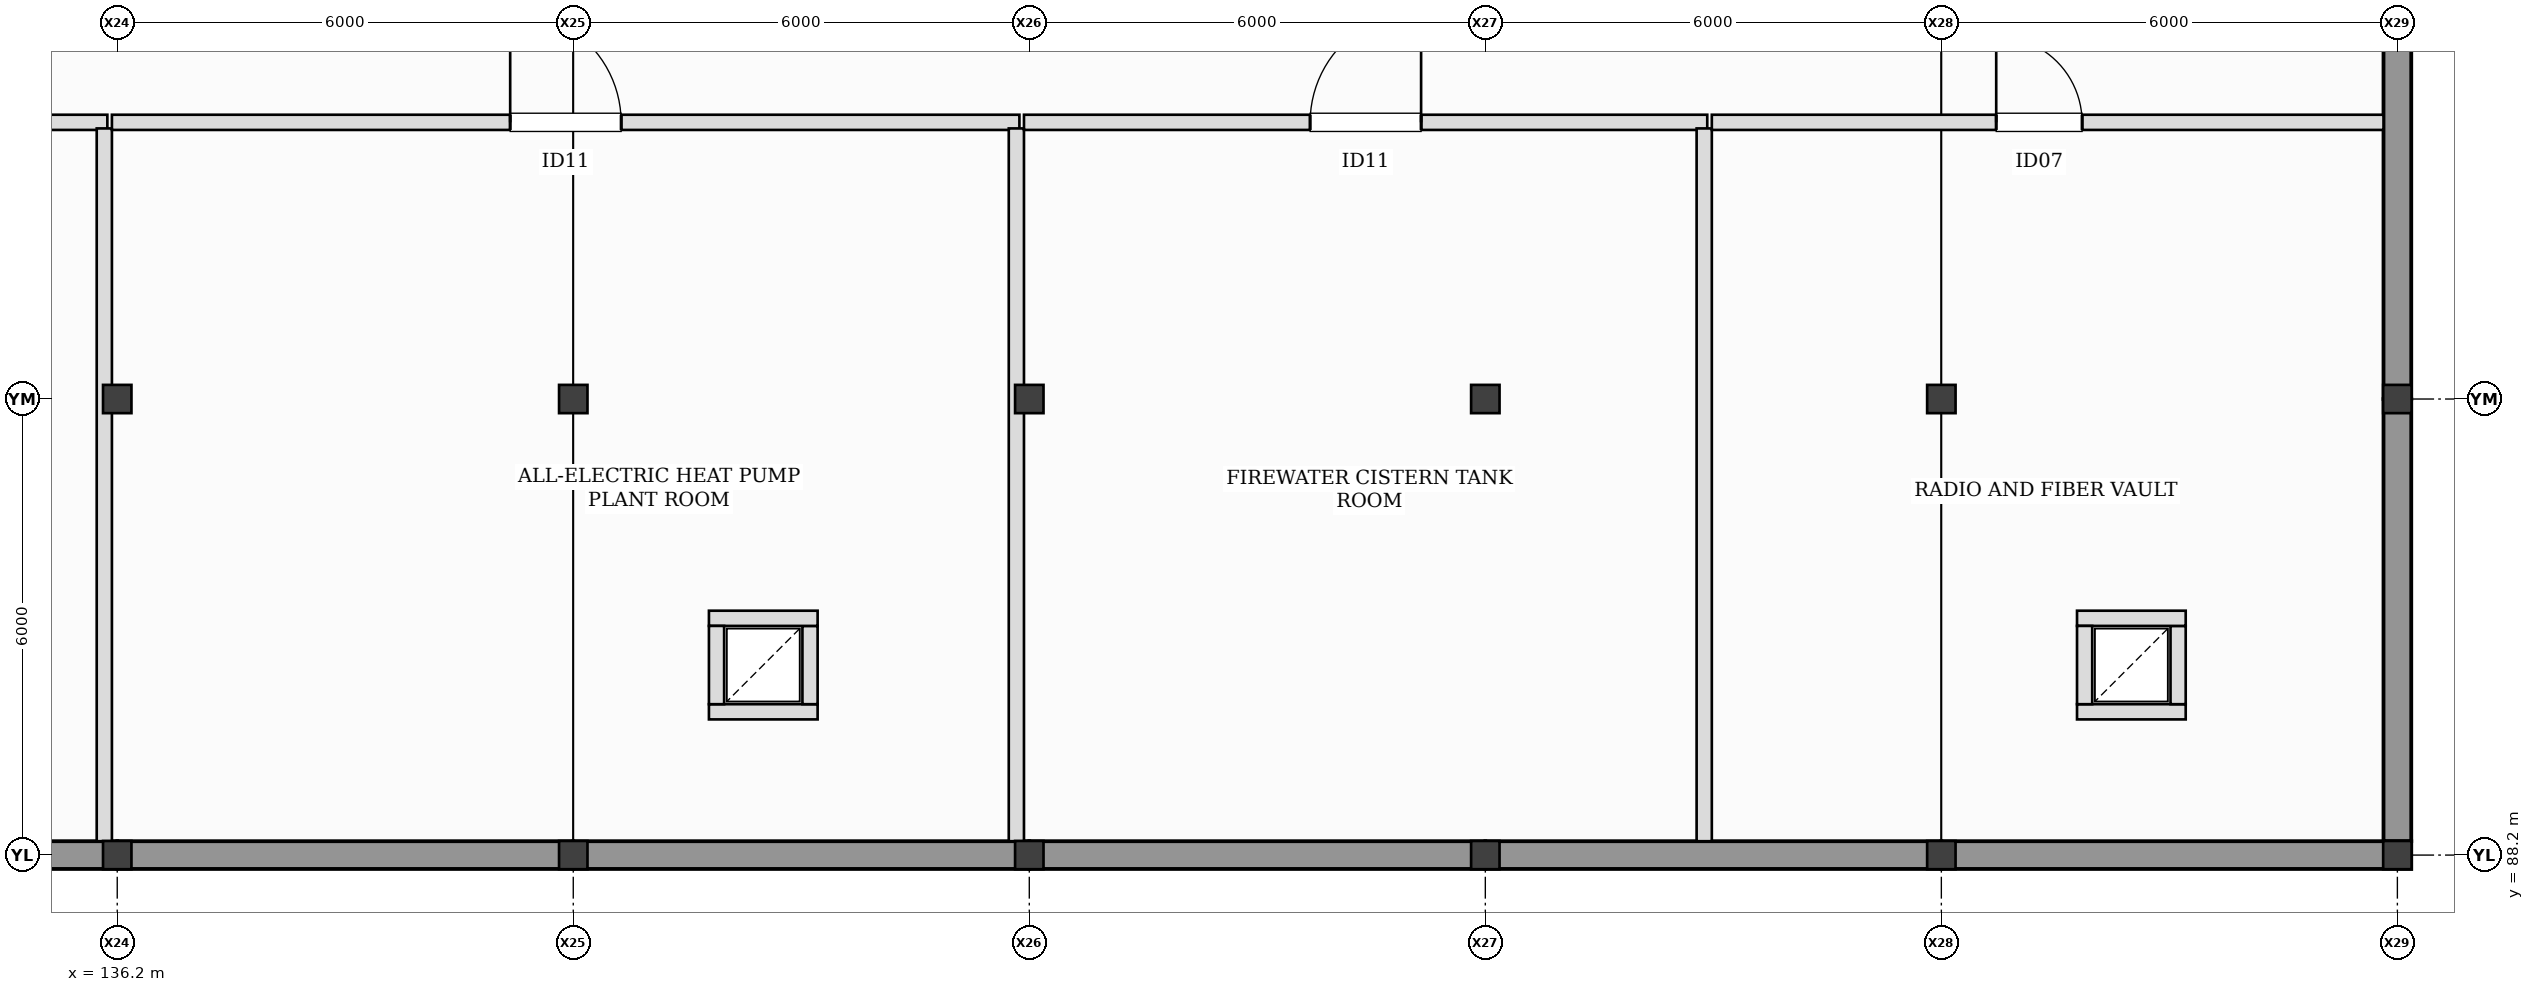
"""IFC4 building model, lengths in metres.
Left out: names, types, materials, properties, quantities, classifications, styles, units other than length and angle.
Written with IfcOpenShell. Run it as: python <this file> out.ifc"""

import sys

from ifc_helpers import new_model, si_unit, direction, frame, frame_2d, origin, origin_2d, place, context, subcontext, project, spatial, rectangle, i_section, extrude, element, fill, save


model = new_model("IFC4")
c1 = context("Model", 3, precision=1e-05, world=origin(), true_north=direction((0.0, 1.0)))
c2 = subcontext(c1, "Body", "Model", "MODEL_VIEW")
j1 = project(units=[si_unit("LENGTHUNIT", "METRE"), si_unit("PLANEANGLEUNIT", "RADIAN")], contexts=[c1])
p1 = place(None, origin())
s1 = spatial("IfcSite", under=j1, at=p1, CompositionType="ELEMENT")
p2 = place(p1, origin())
s2 = spatial("IfcBuilding", under=s1, at=p2, CompositionType="ELEMENT")
p3 = place(p2, frame((0.0, 0.0, -4.2)))
s3 = spatial("IfcBuildingStorey", under=s2, at=p3, CompositionType="ELEMENT", Elevation=-4.2)
for number, where, z_axis, x_axis in (
    (1, (136.2, 88.2, -0.45), (0.0, 0.0, 1.0), (1.0, 0.0, 0.0)),
    (2, (136.2, 94.2, -0.45), (0.0, 0.0, 1.0), (1.0, 0.0, 0.0)),
    (3, (142.2, 88.2, -0.45), (0.0, 0.0, 1.0), (1.0, 0.0, 0.0)),
    (4, (142.2, 94.2, -0.45), (0.0, 0.0, 1.0), (1.0, 0.0, 0.0)),
    (5, (148.2, 88.2, -0.45), (0.0, 0.0, 1.0), (1.0, 0.0, 0.0)),
    (6, (148.2, 94.2, -0.45), (0.0, 0.0, 1.0), (1.0, 0.0, 0.0)),
    (7, (154.2, 88.2, -0.45), (0.0, 0.0, 1.0), (1.0, 0.0, 0.0)),
    (8, (154.2, 94.2, -0.45), (0.0, 0.0, 1.0), (1.0, 0.0, 0.0)),
    (9, (160.2, 88.2, -0.45), (0.0, 0.0, 1.0), (1.0, 0.0, 0.0)),
    (10, (160.2, 94.2, -0.45), (0.0, 0.0, 1.0), (1.0, 0.0, 0.0)),
    (11, (166.2, 88.2, -0.45), (0.0, 0.0, 1.0), (1.0, 0.0, 0.0)),
    (12, (166.2, 94.2, -0.45), (0.0, 0.0, 1.0), (1.0, 0.0, 0.0)),
):
    element("IfcColumn", number, at=place(p3, frame(where, z_axis=z_axis, x_axis=x_axis)), inside=s3, PredefinedType="COLUMN", context=c2, shape_type="SweptSolid", body=[
        extrude(i_section(OverallWidth=0.374, OverallDepth=0.372, WebThickness=0.016, FlangeThickness=0.026, at=origin_2d()), origin(), (0.0, 0.0, 1.0), 4.65),
    ])
for number, where, z_axis, x_axis in (
    (13, (130.201, 88.2, 0.0), (0.0, 0.0, 1.0), (1.0, 0.0, 0.0)),
    (14, (136.201, 88.2, 0.0), (0.0, 0.0, 1.0), (1.0, 0.0, 0.0)),
    (15, (142.201, 88.2, 0.0), (0.0, 0.0, 1.0), (1.0, 0.0, 0.0)),
    (16, (148.201, 88.2, 0.0), (0.0, 0.0, 1.0), (1.0, 0.0, 0.0)),
    (17, (154.201, 88.2, 0.0), (0.0, 0.0, 1.0), (1.0, 0.0, 0.0)),
):
    element("IfcWall", number, at=place(p3, frame(where, z_axis=z_axis, x_axis=x_axis)), inside=s3, PredefinedType="SHEAR", context=c2, shape_type="SweptSolid", body=[
        extrude(rectangle(XDim=5.998, YDim=0.365, at=frame_2d((2.999, 0.0))), origin(), (0.0, 0.0, 1.0), 3.85),
    ])
p4 = place(p3, frame((160.201, 88.2, 0.0), z_axis=(0.0, 0.0, 1.0), x_axis=(1.0, 0.0, 0.0)))
e18 = element("IfcWall", 18, at=p4, inside=s3, PredefinedType="SHEAR", context=c2, shape_type="SweptSolid", body=[
    extrude(rectangle(XDim=6.182, YDim=0.365, at=frame_2d((3.091, 0.0))), origin(), (0.0, 0.0, 1.0), 3.85),
])
p5 = place(p3, frame((166.2, 88.385, 0.0), z_axis=(0.0, 0.0, 1.0), x_axis=(0.0, 1.0, 0.0)))
e19 = element("IfcWall", 19, at=p5, inside=s3, PredefinedType="SHEAR", context=c2, shape_type="SweptSolid", body=[
    extrude(rectangle(XDim=5.814, YDim=0.365, at=frame_2d((2.907, 0.0))), origin(), (0.0, 0.0, 1.0), 3.85),
])
p6 = place(p3, frame((166.2, 94.201, 0.0), z_axis=(0.0, 0.0, 1.0), x_axis=(0.0, 1.0, 0.0)))
e20 = element("IfcWall", 20, at=p6, inside=s3, PredefinedType="SHEAR", context=c2, shape_type="SweptSolid", body=[
    extrude(rectangle(XDim=5.998, YDim=0.365, at=frame_2d((2.999, 0.0))), origin(), (0.0, 0.0, 1.0), 3.85),
])
p7 = place(p3, frame((143.985, 90.085, 0.0), z_axis=(0.0, 0.0, 1.0), x_axis=(1.0, 0.0, 0.0)))
e21 = element("IfcWall", 21, at=p7, inside=s3, PredefinedType="PARTITIONING", context=c2, shape_type="SweptSolid", body=[
    extrude(rectangle(XDim=1.43, YDim=0.2, at=frame_2d((0.715, 0.0))), origin(), (0.0, 0.0, 1.0), 3.79),
])
p8 = place(p3, frame((145.315, 90.185, 0.0), z_axis=(0.0, 0.0, 1.0), x_axis=(0.0, 1.0, 0.0)))
e22 = element("IfcWall", 22, at=p8, inside=s3, PredefinedType="PARTITIONING", context=c2, shape_type="SweptSolid", body=[
    extrude(rectangle(XDim=1.03, YDim=0.2, at=frame_2d((0.515, 0.0))), origin(), (0.0, 0.0, 1.0), 3.79),
])
p9 = place(p3, frame((145.415, 91.315, 0.0), z_axis=(0.0, 0.0, 1.0), x_axis=(-1.0, 0.0, 0.0)))
e23 = element("IfcWall", 23, at=p9, inside=s3, PredefinedType="PARTITIONING", context=c2, shape_type="SweptSolid", body=[
    extrude(rectangle(XDim=1.43, YDim=0.2, at=frame_2d((0.715, 0.0))), origin(), (0.0, 0.0, 1.0), 3.79),
])
p10 = place(p3, frame((144.085, 91.215, 0.0), z_axis=(0.0, 0.0, 1.0), x_axis=(0.0, -1.0, 0.0)))
e24 = element("IfcWall", 24, at=p10, inside=s3, PredefinedType="PARTITIONING", context=c2, shape_type="SweptSolid", body=[
    extrude(rectangle(XDim=1.03, YDim=0.2, at=frame_2d((0.515, 0.0))), origin(), (0.0, 0.0, 1.0), 3.79),
])
p11 = place(p3, frame((161.985, 90.085, 0.0), z_axis=(0.0, 0.0, 1.0), x_axis=(1.0, 0.0, 0.0)))
e25 = element("IfcWall", 25, at=p11, inside=s3, PredefinedType="PARTITIONING", context=c2, shape_type="SweptSolid", body=[
    extrude(rectangle(XDim=1.43, YDim=0.2, at=frame_2d((0.715, 0.0))), origin(), (0.0, 0.0, 1.0), 3.79),
])
p12 = place(p3, frame((163.315, 90.185, 0.0), z_axis=(0.0, 0.0, 1.0), x_axis=(0.0, 1.0, 0.0)))
e26 = element("IfcWall", 26, at=p12, inside=s3, PredefinedType="PARTITIONING", context=c2, shape_type="SweptSolid", body=[
    extrude(rectangle(XDim=1.03, YDim=0.2, at=frame_2d((0.515, 0.0))), origin(), (0.0, 0.0, 1.0), 3.79),
])
p13 = place(p3, frame((163.415, 91.315, 0.0), z_axis=(0.0, 0.0, 1.0), x_axis=(-1.0, 0.0, 0.0)))
e27 = element("IfcWall", 27, at=p13, inside=s3, PredefinedType="PARTITIONING", context=c2, shape_type="SweptSolid", body=[
    extrude(rectangle(XDim=1.43, YDim=0.2, at=frame_2d((0.715, 0.0))), origin(), (0.0, 0.0, 1.0), 3.79),
])
p14 = place(p3, frame((162.085, 91.215, 0.0), z_axis=(0.0, 0.0, 1.0), x_axis=(0.0, -1.0, 0.0)))
e28 = element("IfcWall", 28, at=p14, inside=s3, PredefinedType="PARTITIONING", context=c2, shape_type="SweptSolid", body=[
    extrude(rectangle(XDim=1.03, YDim=0.2, at=frame_2d((0.515, 0.0))), origin(), (0.0, 0.0, 1.0), 3.79),
])
p15 = place(p3, frame((124.383, 97.84, 0.0), z_axis=(0.0, 0.0, 1.0), x_axis=(1.0, 0.0, 0.0)))
e29 = element("IfcWall", 29, at=p15, inside=s3, PredefinedType="PARTITIONING", context=c2, shape_type="SweptSolid", body=[
    extrude(rectangle(XDim=11.688, YDim=0.2, at=frame_2d((5.844, 0.0))), origin(), (0.0, 0.0, 1.0), 3.79),
])
p16 = place(p15, frame((5.224, 0.0, 0.0)))
e30 = element("IfcOpeningElement", 30, at=p16, cuts=e29, PredefinedType="OPENING", context=c2, shape_type="SweptSolid", body=[
    extrude(rectangle(XDim=1.46, YDim=2.3, at=frame_2d((0.73, 1.15))), frame((0.0, 0.11, 0.0), z_axis=(0.0, -1.0, 0.0), x_axis=(1.0, 0.0, 0.0)), (0.0, 0.0, 1.0), 0.22),
])
p17 = place(p3, frame((136.03, 97.76, 0.0), z_axis=(0.0, 0.0, 1.0), x_axis=(0.0, -1.0, 0.0)))
e31 = element("IfcWall", 31, at=p17, inside=s3, PredefinedType="PARTITIONING", context=c2, shape_type="SweptSolid", body=[
    extrude(rectangle(XDim=9.377, YDim=0.2, at=frame_2d((4.689, 0.0))), origin(), (0.0, 0.0, 1.0), 3.79),
])
p18 = place(p3, frame((136.13, 97.84, 0.0), z_axis=(0.0, 0.0, 1.0), x_axis=(1.0, 0.0, 0.0)))
e32 = element("IfcWall", 32, at=p18, inside=s3, PredefinedType="PARTITIONING", context=c2, shape_type="SweptSolid", body=[
    extrude(rectangle(XDim=11.94, YDim=0.2, at=frame_2d((5.97, 0.0))), origin(), (0.0, 0.0, 1.0), 3.79),
])
p19 = place(p18, frame((5.24, 0.0, 0.0)))
e33 = element("IfcOpeningElement", 33, at=p19, cuts=e32, PredefinedType="OPENING", context=c2, shape_type="SweptSolid", body=[
    extrude(rectangle(XDim=1.46, YDim=2.3, at=frame_2d((0.73, 1.15))), frame((0.0, 0.11, 0.0), z_axis=(0.0, -1.0, 0.0), x_axis=(1.0, 0.0, 0.0)), (0.0, 0.0, 1.0), 0.22),
])
p20 = place(p3, frame((148.03, 97.76, 0.0), z_axis=(0.0, 0.0, 1.0), x_axis=(0.0, -1.0, 0.0)))
e34 = element("IfcWall", 34, at=p20, inside=s3, PredefinedType="PARTITIONING", context=c2, shape_type="SweptSolid", body=[
    extrude(rectangle(XDim=9.377, YDim=0.2, at=frame_2d((4.689, 0.0))), origin(), (0.0, 0.0, 1.0), 3.79),
])
p21 = place(p3, frame((148.13, 97.84, 0.0), z_axis=(0.0, 0.0, 1.0), x_axis=(1.0, 0.0, 0.0)))
e35 = element("IfcWall", 35, at=p21, inside=s3, PredefinedType="PARTITIONING", context=c2, shape_type="SweptSolid", body=[
    extrude(rectangle(XDim=8.99, YDim=0.2, at=frame_2d((4.495, 0.0))), origin(), (0.0, 0.0, 1.0), 3.79),
])
p22 = place(p21, frame((3.765, 0.0, 0.0)))
e36 = element("IfcOpeningElement", 36, at=p22, cuts=e35, PredefinedType="OPENING", context=c2, shape_type="SweptSolid", body=[
    extrude(rectangle(XDim=1.46, YDim=2.3, at=frame_2d((0.73, 1.15))), frame((0.0, 0.11, 0.0), z_axis=(0.0, -1.0, 0.0), x_axis=(1.0, 0.0, 0.0)), (0.0, 0.0, 1.0), 0.22),
])
p23 = place(p3, frame((157.08, 97.76, 0.0), z_axis=(0.0, 0.0, 1.0), x_axis=(0.0, -1.0, 0.0)))
e37 = element("IfcWall", 37, at=p23, inside=s3, PredefinedType="PARTITIONING", context=c2, shape_type="SweptSolid", body=[
    extrude(rectangle(XDim=9.377, YDim=0.2, at=frame_2d((4.689, 0.0))), origin(), (0.0, 0.0, 1.0), 3.79),
])
p24 = place(p3, frame((157.18, 97.84, 0.0), z_axis=(0.0, 0.0, 1.0), x_axis=(1.0, 0.0, 0.0)))
e38 = element("IfcWall", 38, at=p24, inside=s3, PredefinedType="PARTITIONING", context=c2, shape_type="SweptSolid", body=[
    extrude(rectangle(XDim=8.838, YDim=0.2, at=frame_2d((4.419, 0.0))), origin(), (0.0, 0.0, 1.0), 3.79),
])
p25 = place(p24, frame((3.742, 0.0, 0.0)))
e39 = element("IfcOpeningElement", 39, at=p25, cuts=e38, PredefinedType="OPENING", context=c2, shape_type="SweptSolid", body=[
    extrude(rectangle(XDim=1.13, YDim=2.18, at=frame_2d((0.565, 1.09))), frame((0.0, 0.11, 0.0), z_axis=(0.0, -1.0, 0.0), x_axis=(1.0, 0.0, 0.0)), (0.0, 0.0, 1.0), 0.22),
])
p26 = place(p19, frame((1.46, 0.0, 0.0), z_axis=(0.0, 0.0, 1.0), x_axis=(-1.0, 0.0, 0.0)))
e40 = element("IfcDoor", 40, at=p26, inside=s3, OperationType="SINGLE_SWING_LEFT", PredefinedType="DOOR", context=c2, shape_type="SweptSolid", body=[
    extrude(rectangle(XDim=1.46, YDim=2.3, at=frame_2d((0.73, 1.15))), frame((0.0, 0.025, 0.0), z_axis=(0.0, -1.0, 0.0), x_axis=(1.0, 0.0, 0.0)), (0.0, 0.0, 1.0), 0.05),
])
fill(e33, e40)
p27 = place(p22, frame((1.46, 0.0, 0.0), z_axis=(0.0, 0.0, 1.0), x_axis=(-1.0, 0.0, 0.0)))
e41 = element("IfcDoor", 41, at=p27, inside=s3, OperationType="SINGLE_SWING_RIGHT", PredefinedType="DOOR", context=c2, shape_type="SweptSolid", body=[
    extrude(rectangle(XDim=1.46, YDim=2.3, at=frame_2d((0.73, 1.15))), frame((0.0, 0.025, 0.0), z_axis=(0.0, -1.0, 0.0), x_axis=(1.0, 0.0, 0.0)), (0.0, 0.0, 1.0), 0.05),
])
fill(e36, e41)
p28 = place(p25, frame((1.13, 0.0, 0.0), z_axis=(0.0, 0.0, 1.0), x_axis=(-1.0, 0.0, 0.0)))
e42 = element("IfcDoor", 42, at=p28, inside=s3, OperationType="SINGLE_SWING_LEFT", PredefinedType="DOOR", context=c2, shape_type="SweptSolid", body=[
    extrude(rectangle(XDim=1.13, YDim=2.18, at=frame_2d((0.565, 1.09))), frame((0.0, 0.025, 0.0), z_axis=(0.0, -1.0, 0.0), x_axis=(1.0, 0.0, 0.0)), (0.0, 0.0, 1.0), 0.05),
])
fill(e39, e42)
save(model, sys.argv[1])
